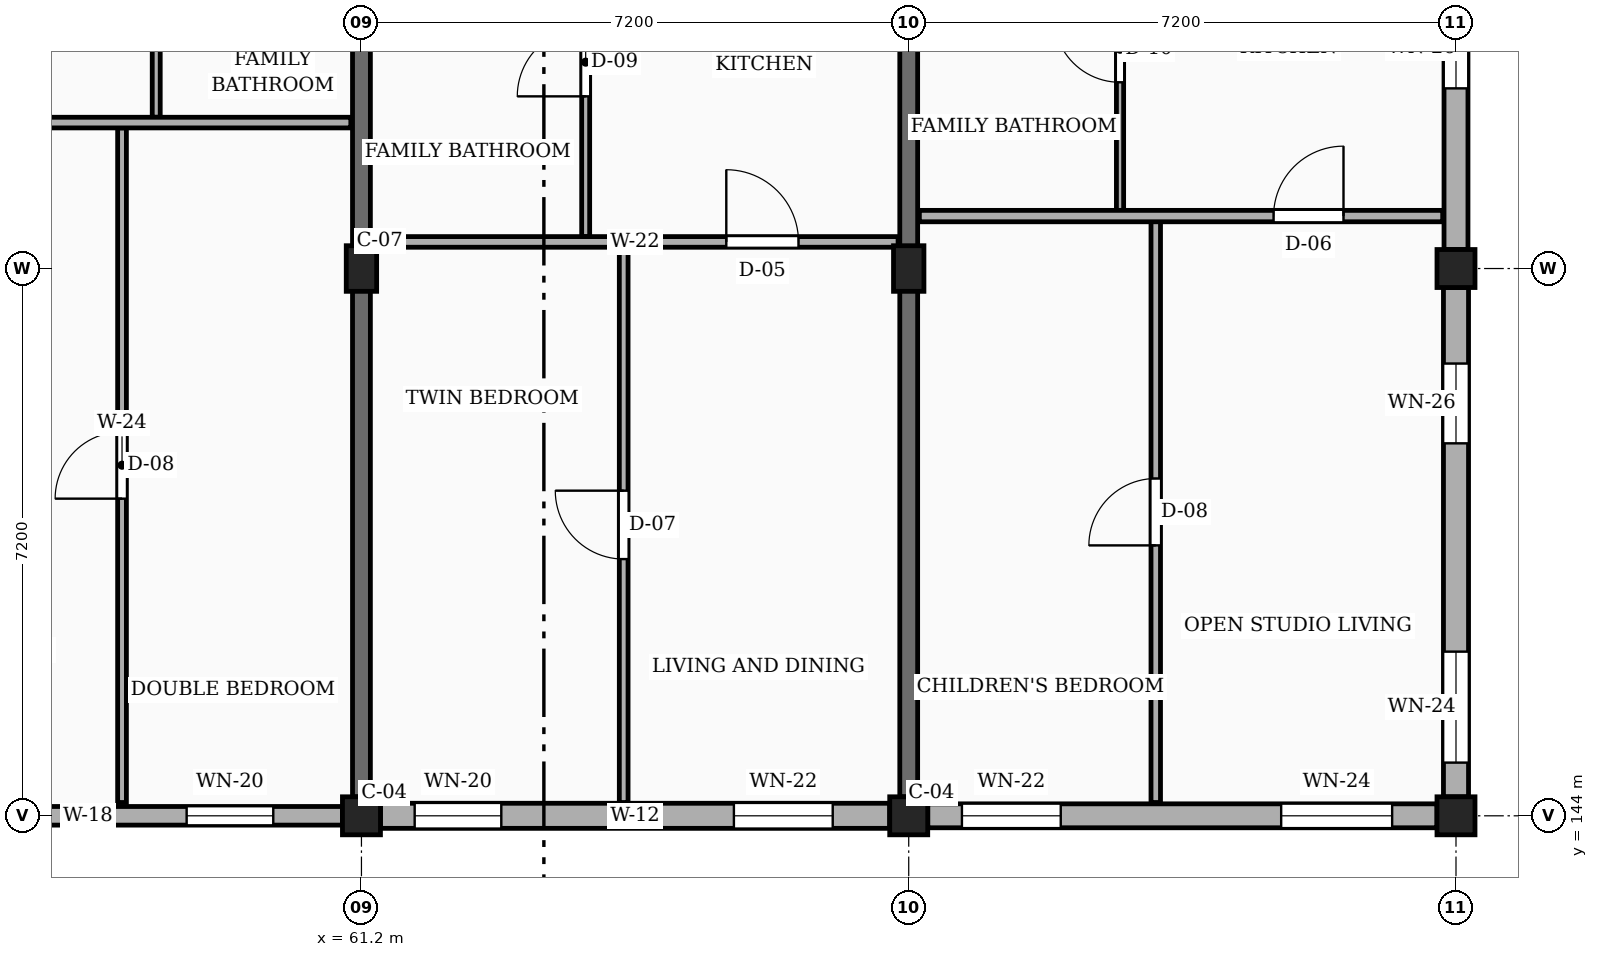
"""IFC4 building model, lengths in metres.
Left out: names, types, materials, properties, quantities, classifications, styles, units other than length and angle.
Written with IfcOpenShell. Run it as: python <this file> out.ifc"""

import sys

from ifc_helpers import new_model, si_unit, direction, frame, frame_2d, origin, origin_2d, place, context, subcontext, project, spatial, rectangle, extrude, element, fill, save


model = new_model("IFC4")
c1 = context("Model", 3, precision=1e-05, world=origin(), true_north=direction((0.0, 1.0)))
c2 = subcontext(c1, "Body", "Model", "MODEL_VIEW")
j1 = project(units=[si_unit("LENGTHUNIT", "METRE"), si_unit("PLANEANGLEUNIT", "RADIAN")], contexts=[c1])
p1 = place(None, origin())
s1 = spatial("IfcSite", under=j1, at=p1, CompositionType="ELEMENT")
p2 = place(p1, origin())
s2 = spatial("IfcBuilding", under=s1, at=p2, CompositionType="ELEMENT")
p3 = place(p2, frame((0.0, 0.0, 23.4)))
s3 = spatial("IfcBuildingStorey", under=s2, at=p3, CompositionType="ELEMENT", Elevation=23.4)
p4 = place(p3, frame((61.2, 144.0, 0.0), z_axis=(0.0, 0.0, 1.0), x_axis=(1.0, 0.0, 0.0)))
e1 = element("IfcColumn", 1, at=p4, inside=s3, PredefinedType="COLUMN", context=c2, shape_type="SweptSolid", body=[
    extrude(rectangle(XDim=0.5, YDim=0.5, at=origin_2d()), origin(), (0.0, 0.0, 1.0), 3.15),
])
p5 = place(p3, frame((61.2, 151.2, 0.0), z_axis=(0.0, 0.0, 1.0), x_axis=(1.0, 0.0, 0.0)))
e2 = element("IfcColumn", 2, at=p5, inside=s3, PredefinedType="COLUMN", context=c2, shape_type="SweptSolid", body=[
    extrude(rectangle(XDim=0.4, YDim=0.6, at=origin_2d()), origin(), (0.0, 0.0, 1.0), 3.15),
])
p6 = place(p3, frame((68.4, 144.0, 0.0), z_axis=(0.0, 0.0, 1.0), x_axis=(1.0, 0.0, 0.0)))
e3 = element("IfcColumn", 3, at=p6, inside=s3, PredefinedType="COLUMN", context=c2, shape_type="SweptSolid", body=[
    extrude(rectangle(XDim=0.5, YDim=0.5, at=origin_2d()), origin(), (0.0, 0.0, 1.0), 3.15),
])
p7 = place(p3, frame((68.4, 151.2, 0.0), z_axis=(0.0, 0.0, 1.0), x_axis=(1.0, 0.0, 0.0)))
e4 = element("IfcColumn", 4, at=p7, inside=s3, PredefinedType="COLUMN", context=c2, shape_type="SweptSolid", body=[
    extrude(rectangle(XDim=0.4, YDim=0.6, at=origin_2d()), origin(), (0.0, 0.0, 1.0), 3.15),
])
for number, where, z_axis, x_axis in (
    (5, (75.6, 144.0, 0.0), (0.0, 0.0, 1.0), (1.0, 0.0, 0.0)),
    (6, (75.6, 151.2, 0.0), (0.0, 0.0, 1.0), (1.0, 0.0, 0.0)),
):
    element("IfcColumn", number, at=place(p3, frame(where, z_axis=z_axis, x_axis=x_axis)), inside=s3, PredefinedType="COLUMN", context=c2, shape_type="SweptSolid", body=[
        extrude(rectangle(XDim=0.5, YDim=0.5, at=origin_2d()), origin(), (0.0, 0.0, 1.0), 3.15),
    ])
for number, where, z_axis, x_axis in (
    (7, (61.2, 144.25, 0.0), (0.0, 0.0, 1.0), (0.0, 1.0, 0.0)),
    (8, (68.4, 144.25, 0.0), (0.0, 0.0, 1.0), (0.0, 1.0, 0.0)),
):
    element("IfcWall", number, at=place(p3, frame(where, z_axis=z_axis, x_axis=x_axis)), inside=s3, PredefinedType="SOLIDWALL", context=c2, shape_type="SweptSolid", body=[
        extrude(rectangle(XDim=11.9, YDim=0.235, at=frame_2d((5.95, 0.0))), origin(), (0.0, 0.0, 1.0), 2.185),
    ])
p8 = place(p3, frame((54.25, 144.0, 0.0), z_axis=(0.0, 0.0, 1.0), x_axis=(1.0, 0.0, 0.0)))
e9 = element("IfcWall", 9, at=p8, inside=s3, PredefinedType="SOLIDWALL", context=c2, shape_type="SweptSolid", body=[
    extrude(rectangle(XDim=6.7, YDim=0.245, at=frame_2d((3.35, 0.0))), origin(), (0.0, 0.0, 1.0), 2.455),
])
p9 = place(p8, frame((0.45, 0.0, 0.78)))
e10 = element("IfcOpeningElement", 10, at=p9, cuts=e9, PredefinedType="OPENING", context=c2, shape_type="SweptSolid", body=[
    extrude(rectangle(XDim=0.98, YDim=1.36, at=frame_2d((0.49, 0.68))), frame((0.0, 0.133, 0.0), z_axis=(0.0, -1.0, 0.0), x_axis=(1.0, 0.0, 0.0)), (0.0, 0.0, 1.0), 0.265),
])
p10 = place(p8, frame((4.65, 0.0, 0.78)))
e11 = element("IfcOpeningElement", 11, at=p10, cuts=e9, PredefinedType="OPENING", context=c2, shape_type="SweptSolid", body=[
    extrude(rectangle(XDim=1.14, YDim=1.36, at=frame_2d((0.57, 0.68))), frame((0.0, 0.133, 0.0), z_axis=(0.0, -1.0, 0.0), x_axis=(1.0, 0.0, 0.0)), (0.0, 0.0, 1.0), 0.265),
])
p11 = place(p3, frame((61.45, 144.0, 0.0), z_axis=(0.0, 0.0, 1.0), x_axis=(1.0, 0.0, 0.0)))
e12 = element("IfcWall", 12, at=p11, inside=s3, PredefinedType="SOLIDWALL", context=c2, shape_type="SweptSolid", body=[
    extrude(rectangle(XDim=6.7, YDim=0.33, at=frame_2d((3.35, 0.0))), origin(), (0.0, 0.0, 1.0), 2.455),
])
p12 = place(p11, frame((0.45, 0.0, 0.78)))
e13 = element("IfcOpeningElement", 13, at=p12, cuts=e12, PredefinedType="OPENING", context=c2, shape_type="SweptSolid", body=[
    extrude(rectangle(XDim=1.14, YDim=1.36, at=frame_2d((0.57, 0.68))), frame((0.0, 0.175, 0.0), z_axis=(0.0, -1.0, 0.0), x_axis=(1.0, 0.0, 0.0)), (0.0, 0.0, 1.0), 0.35),
])
p13 = place(p11, frame((4.65, 0.0, 0.78)))
e14 = element("IfcOpeningElement", 14, at=p13, cuts=e12, PredefinedType="OPENING", context=c2, shape_type="SweptSolid", body=[
    extrude(rectangle(XDim=1.3, YDim=1.36, at=frame_2d((0.65, 0.68))), frame((0.0, 0.175, 0.0), z_axis=(0.0, -1.0, 0.0), x_axis=(1.0, 0.0, 0.0)), (0.0, 0.0, 1.0), 0.35),
])
p14 = place(p3, frame((68.65, 144.0, 0.0), z_axis=(0.0, 0.0, 1.0), x_axis=(1.0, 0.0, 0.0)))
e15 = element("IfcWall", 15, at=p14, inside=s3, PredefinedType="SOLIDWALL", context=c2, shape_type="SweptSolid", body=[
    extrude(rectangle(XDim=6.7, YDim=0.315, at=frame_2d((3.35, 0.0))), origin(), (0.0, 0.0, 1.0), 2.455),
])
p15 = place(p14, frame((0.45, 0.0, 0.78)))
e16 = element("IfcOpeningElement", 16, at=p15, cuts=e15, PredefinedType="OPENING", context=c2, shape_type="SweptSolid", body=[
    extrude(rectangle(XDim=1.3, YDim=1.36, at=frame_2d((0.65, 0.68))), frame((0.0, 0.167, 0.0), z_axis=(0.0, -1.0, 0.0), x_axis=(1.0, 0.0, 0.0)), (0.0, 0.0, 1.0), 0.335),
])
p16 = place(p14, frame((4.65, 0.0, 0.78)))
e17 = element("IfcOpeningElement", 17, at=p16, cuts=e15, PredefinedType="OPENING", context=c2, shape_type="SweptSolid", body=[
    extrude(rectangle(XDim=1.46, YDim=1.36, at=frame_2d((0.73, 0.68))), frame((0.0, 0.167, 0.0), z_axis=(0.0, -1.0, 0.0), x_axis=(1.0, 0.0, 0.0)), (0.0, 0.0, 1.0), 0.335),
])
p17 = place(p3, frame((75.6, 144.25, 0.0), z_axis=(0.0, 0.0, 1.0), x_axis=(0.0, 1.0, 0.0)))
e18 = element("IfcWall", 18, at=p17, inside=s3, PredefinedType="SOLIDWALL", context=c2, shape_type="SweptSolid", body=[
    extrude(rectangle(XDim=6.7, YDim=0.33, at=frame_2d((3.35, 0.0))), origin(), (0.0, 0.0, 1.0), 2.455),
])
p18 = place(p17, frame((0.45, 0.0, 0.78)))
e19 = element("IfcOpeningElement", 19, at=p18, cuts=e18, PredefinedType="OPENING", context=c2, shape_type="SweptSolid", body=[
    extrude(rectangle(XDim=1.46, YDim=1.36, at=frame_2d((0.73, 0.68))), frame((0.0, 0.175, 0.0), z_axis=(0.0, -1.0, 0.0), x_axis=(1.0, 0.0, 0.0)), (0.0, 0.0, 1.0), 0.35),
])
p19 = place(p17, frame((4.65, 0.0, 0.78)))
e20 = element("IfcOpeningElement", 20, at=p19, cuts=e18, PredefinedType="OPENING", context=c2, shape_type="SweptSolid", body=[
    extrude(rectangle(XDim=1.05, YDim=1.44, at=frame_2d((0.525, 0.72))), frame((0.0, 0.175, 0.0), z_axis=(0.0, -1.0, 0.0), x_axis=(1.0, 0.0, 0.0)), (0.0, 0.0, 1.0), 0.35),
])
p20 = place(p3, frame((75.6, 151.45, 0.0), z_axis=(0.0, 0.0, 1.0), x_axis=(0.0, 1.0, 0.0)))
e21 = element("IfcWall", 21, at=p20, inside=s3, PredefinedType="SOLIDWALL", context=c2, shape_type="SweptSolid", body=[
    extrude(rectangle(XDim=6.7, YDim=0.315, at=frame_2d((3.35, 0.0))), origin(), (0.0, 0.0, 1.0), 2.455),
])
p21 = place(p20, frame((2.12, 0.0, 0.78)))
e22 = element("IfcOpeningElement", 22, at=p21, cuts=e21, PredefinedType="OPENING", context=c2, shape_type="SweptSolid", body=[
    extrude(rectangle(XDim=1.05, YDim=1.44, at=frame_2d((0.525, 0.72))), frame((0.0, 0.167, 0.0), z_axis=(0.0, -1.0, 0.0), x_axis=(1.0, 0.0, 0.0)), (0.0, 0.0, 1.0), 0.335),
])
p22 = place(p20, frame((5.185, 0.0, 0.78)))
e23 = element("IfcOpeningElement", 23, at=p22, cuts=e21, PredefinedType="OPENING", context=c2, shape_type="SweptSolid", body=[
    extrude(rectangle(XDim=1.04, YDim=1.26, at=frame_2d((0.52, 0.63))), frame((0.0, 0.167, 0.0), z_axis=(0.0, -1.0, 0.0), x_axis=(1.0, 0.0, 0.0)), (0.0, 0.0, 1.0), 0.335),
])
p23 = place(p3, frame((58.05, 144.175, 0.0), z_axis=(0.0, 0.0, 1.0), x_axis=(0.0, 1.0, 0.0)))
e24 = element("IfcWall", 24, at=p23, inside=s3, PredefinedType="PARTITIONING", context=c2, shape_type="SweptSolid", body=[
    extrude(rectangle(XDim=8.875, YDim=0.115, at=frame_2d((4.438, 0.0))), origin(), (0.0, 0.0, 1.0), 2.32),
])
p24 = place(p23, frame((3.998, 0.0, 0.0)))
e25 = element("IfcOpeningElement", 25, at=p24, cuts=e24, PredefinedType="OPENING", context=c2, shape_type="SweptSolid", body=[
    extrude(rectangle(XDim=0.88, YDim=2.08, at=frame_2d((0.44, 1.04))), frame((0.0, 0.067, 0.0), z_axis=(0.0, -1.0, 0.0), x_axis=(1.0, 0.0, 0.0)), (0.0, 0.0, 1.0), 0.135),
])
p25 = place(p3, frame((58.5, 153.19, 0.0), z_axis=(0.0, 0.0, 1.0), x_axis=(0.0, 1.0, 0.0)))
e26 = element("IfcWall", 26, at=p25, inside=s3, PredefinedType="PARTITIONING", context=c2, shape_type="SweptSolid", body=[
    extrude(rectangle(XDim=3.02, YDim=0.105, at=frame_2d((1.51, 0.0))), origin(), (0.0, 0.0, 1.0), 2.32),
])
p26 = place(p25, frame((1.075, 0.0, 0.0)))
e27 = element("IfcOpeningElement", 27, at=p26, cuts=e26, PredefinedType="OPENING", context=c2, shape_type="SweptSolid", body=[
    extrude(rectangle(XDim=0.87, YDim=2.05, at=frame_2d((0.435, 1.025))), frame((0.0, 0.062, 0.0), z_axis=(0.0, -1.0, 0.0), x_axis=(1.0, 0.0, 0.0)), (0.0, 0.0, 1.0), 0.125),
])
p27 = place(p3, frame((54.14, 153.12, 0.0), z_axis=(0.0, 0.0, 1.0), x_axis=(1.0, 0.0, 0.0)))
e28 = element("IfcWall", 28, at=p27, inside=s3, PredefinedType="PARTITIONING", context=c2, shape_type="SweptSolid", body=[
    extrude(rectangle(XDim=6.92, YDim=0.14, at=frame_2d((3.46, 0.0))), origin(), (0.0, 0.0, 1.0), 2.32),
])
p28 = place(p27, frame((1.31, 0.0, 0.0)))
e29 = element("IfcOpeningElement", 29, at=p28, cuts=e28, PredefinedType="OPENING", context=c2, shape_type="SweptSolid", body=[
    extrude(rectangle(XDim=0.92, YDim=2.1, at=frame_2d((0.46, 1.05))), frame((0.0, 0.08, 0.0), z_axis=(0.0, -1.0, 0.0), x_axis=(1.0, 0.0, 0.0)), (0.0, 0.0, 1.0), 0.16),
])
p29 = place(p3, frame((64.65, 144.175, 0.0), z_axis=(0.0, 0.0, 1.0), x_axis=(0.0, 1.0, 0.0)))
e30 = element("IfcWall", 30, at=p29, inside=s3, PredefinedType="PARTITIONING", context=c2, shape_type="SweptSolid", body=[
    extrude(rectangle(XDim=7.305, YDim=0.115, at=frame_2d((3.652, 0.0))), origin(), (0.0, 0.0, 1.0), 2.32),
])
p30 = place(p29, frame((3.202, 0.0, 0.0)))
e31 = element("IfcOpeningElement", 31, at=p30, cuts=e30, PredefinedType="OPENING", context=c2, shape_type="SweptSolid", body=[
    extrude(rectangle(XDim=0.9, YDim=2.1, at=frame_2d((0.45, 1.05))), frame((0.0, 0.067, 0.0), z_axis=(0.0, -1.0, 0.0), x_axis=(1.0, 0.0, 0.0)), (0.0, 0.0, 1.0), 0.135),
])
p31 = place(p3, frame((64.15, 151.62, 0.0), z_axis=(0.0, 0.0, 1.0), x_axis=(0.0, 1.0, 0.0)))
e32 = element("IfcWall", 32, at=p31, inside=s3, PredefinedType="PARTITIONING", context=c2, shape_type="SweptSolid", body=[
    extrude(rectangle(XDim=4.59, YDim=0.105, at=frame_2d((2.295, 0.0))), origin(), (0.0, 0.0, 1.0), 2.32),
])
p32 = place(p31, frame((1.845, 0.0, 0.0)))
e33 = element("IfcOpeningElement", 33, at=p32, cuts=e32, PredefinedType="OPENING", context=c2, shape_type="SweptSolid", body=[
    extrude(rectangle(XDim=0.9, YDim=2.05, at=frame_2d((0.45, 1.025))), frame((0.0, 0.062, 0.0), z_axis=(0.0, -1.0, 0.0), x_axis=(1.0, 0.0, 0.0)), (0.0, 0.0, 1.0), 0.125),
])
p33 = place(p3, frame((61.34, 151.55, 0.0), z_axis=(0.0, 0.0, 1.0), x_axis=(1.0, 0.0, 0.0)))
e34 = element("IfcWall", 34, at=p33, inside=s3, PredefinedType="PARTITIONING", context=c2, shape_type="SweptSolid", body=[
    extrude(rectangle(XDim=6.92, YDim=0.14, at=frame_2d((3.46, 0.0))), origin(), (0.0, 0.0, 1.0), 2.32),
])
p34 = place(p33, frame((4.66, 0.0, 0.0)))
e35 = element("IfcOpeningElement", 35, at=p34, cuts=e34, PredefinedType="OPENING", context=c2, shape_type="SweptSolid", body=[
    extrude(rectangle(XDim=0.95, YDim=2.1, at=frame_2d((0.475, 1.05))), frame((0.0, 0.08, 0.0), z_axis=(0.0, -1.0, 0.0), x_axis=(1.0, 0.0, 0.0)), (0.0, 0.0, 1.0), 0.16),
])
p35 = place(p3, frame((71.65, 144.175, 0.0), z_axis=(0.0, 0.0, 1.0), x_axis=(0.0, 1.0, 0.0)))
e36 = element("IfcWall", 36, at=p35, inside=s3, PredefinedType="PARTITIONING", context=c2, shape_type="SweptSolid", body=[
    extrude(rectangle(XDim=7.645, YDim=0.125, at=frame_2d((3.823, 0.0))), origin(), (0.0, 0.0, 1.0), 2.32),
])
p36 = place(p35, frame((3.383, 0.0, 0.0)))
e37 = element("IfcOpeningElement", 37, at=p36, cuts=e36, PredefinedType="OPENING", context=c2, shape_type="SweptSolid", body=[
    extrude(rectangle(XDim=0.88, YDim=2.08, at=frame_2d((0.44, 1.04))), frame((0.0, 0.073, 0.0), z_axis=(0.0, -1.0, 0.0), x_axis=(1.0, 0.0, 0.0)), (0.0, 0.0, 1.0), 0.145),
])
p37 = place(p3, frame((71.18, 151.96, 0.0), z_axis=(0.0, 0.0, 1.0), x_axis=(0.0, 1.0, 0.0)))
e38 = element("IfcWall", 38, at=p37, inside=s3, PredefinedType="PARTITIONING", context=c2, shape_type="SweptSolid", body=[
    extrude(rectangle(XDim=4.25, YDim=0.095, at=frame_2d((2.125, 0.0))), origin(), (0.0, 0.0, 1.0), 2.32),
])
p38 = place(p37, frame((1.69, 0.0, 0.0)))
e39 = element("IfcOpeningElement", 39, at=p38, cuts=e38, PredefinedType="OPENING", context=c2, shape_type="SweptSolid", body=[
    extrude(rectangle(XDim=0.87, YDim=2.05, at=frame_2d((0.435, 1.025))), frame((0.0, 0.058, 0.0), z_axis=(0.0, -1.0, 0.0), x_axis=(1.0, 0.0, 0.0)), (0.0, 0.0, 1.0), 0.115),
])
p39 = place(p3, frame((68.54, 151.89, 0.0), z_axis=(0.0, 0.0, 1.0), x_axis=(1.0, 0.0, 0.0)))
e40 = element("IfcWall", 40, at=p39, inside=s3, PredefinedType="PARTITIONING", context=c2, shape_type="SweptSolid", body=[
    extrude(rectangle(XDim=6.885, YDim=0.15, at=frame_2d((3.442, 0.0))), origin(), (0.0, 0.0, 1.0), 2.32),
])
p40 = place(p39, frame((4.66, 0.0, 0.0)))
e41 = element("IfcOpeningElement", 41, at=p40, cuts=e40, PredefinedType="OPENING", context=c2, shape_type="SweptSolid", body=[
    extrude(rectangle(XDim=0.92, YDim=2.1, at=frame_2d((0.46, 1.05))), frame((0.0, 0.085, 0.0), z_axis=(0.0, -1.0, 0.0), x_axis=(1.0, 0.0, 0.0)), (0.0, 0.0, 1.0), 0.17),
])
p41 = place(p10, origin())
e42 = element("IfcWindow", 42, at=p41, inside=s3, PartitioningType="SINGLE_PANEL", PredefinedType="WINDOW", context=c2, shape_type="SweptSolid", body=[
    extrude(rectangle(XDim=1.14, YDim=1.36, at=frame_2d((0.57, 0.68))), frame((0.0, 0.03, 0.0), z_axis=(0.0, -1.0, 0.0), x_axis=(1.0, 0.0, 0.0)), (0.0, 0.0, 1.0), 0.06),
])
fill(e11, e42)
p42 = place(p12, origin())
e43 = element("IfcWindow", 43, at=p42, inside=s3, PartitioningType="SINGLE_PANEL", PredefinedType="WINDOW", context=c2, shape_type="SweptSolid", body=[
    extrude(rectangle(XDim=1.14, YDim=1.36, at=frame_2d((0.57, 0.68))), frame((0.0, 0.03, 0.0), z_axis=(0.0, -1.0, 0.0), x_axis=(1.0, 0.0, 0.0)), (0.0, 0.0, 1.0), 0.06),
])
fill(e13, e43)
p43 = place(p13, origin())
e44 = element("IfcWindow", 44, at=p43, inside=s3, PartitioningType="SINGLE_PANEL", PredefinedType="WINDOW", context=c2, shape_type="SweptSolid", body=[
    extrude(rectangle(XDim=1.3, YDim=1.36, at=frame_2d((0.65, 0.68))), frame((0.0, 0.03, 0.0), z_axis=(0.0, -1.0, 0.0), x_axis=(1.0, 0.0, 0.0)), (0.0, 0.0, 1.0), 0.06),
])
fill(e14, e44)
p44 = place(p15, origin())
e45 = element("IfcWindow", 45, at=p44, inside=s3, PartitioningType="SINGLE_PANEL", PredefinedType="WINDOW", context=c2, shape_type="SweptSolid", body=[
    extrude(rectangle(XDim=1.3, YDim=1.36, at=frame_2d((0.65, 0.68))), frame((0.0, 0.03, 0.0), z_axis=(0.0, -1.0, 0.0), x_axis=(1.0, 0.0, 0.0)), (0.0, 0.0, 1.0), 0.06),
])
fill(e16, e45)
p45 = place(p16, origin())
e46 = element("IfcWindow", 46, at=p45, inside=s3, PartitioningType="SINGLE_PANEL", PredefinedType="WINDOW", context=c2, shape_type="SweptSolid", body=[
    extrude(rectangle(XDim=1.46, YDim=1.36, at=frame_2d((0.73, 0.68))), frame((0.0, 0.03, 0.0), z_axis=(0.0, -1.0, 0.0), x_axis=(1.0, 0.0, 0.0)), (0.0, 0.0, 1.0), 0.06),
])
fill(e17, e46)
p46 = place(p18, origin())
e47 = element("IfcWindow", 47, at=p46, inside=s3, PartitioningType="SINGLE_PANEL", PredefinedType="WINDOW", context=c2, shape_type="SweptSolid", body=[
    extrude(rectangle(XDim=1.46, YDim=1.36, at=frame_2d((0.73, 0.68))), frame((0.0, 0.03, 0.0), z_axis=(0.0, -1.0, 0.0), x_axis=(1.0, 0.0, 0.0)), (0.0, 0.0, 1.0), 0.06),
])
fill(e19, e47)
p47 = place(p19, origin())
e48 = element("IfcWindow", 48, at=p47, inside=s3, PartitioningType="SINGLE_PANEL", PredefinedType="WINDOW", context=c2, shape_type="SweptSolid", body=[
    extrude(rectangle(XDim=1.05, YDim=1.44, at=frame_2d((0.525, 0.72))), frame((0.0, 0.03, 0.0), z_axis=(0.0, -1.0, 0.0), x_axis=(1.0, 0.0, 0.0)), (0.0, 0.0, 1.0), 0.06),
])
fill(e20, e48)
p48 = place(p21, origin())
e49 = element("IfcWindow", 49, at=p48, inside=s3, PartitioningType="SINGLE_PANEL", PredefinedType="WINDOW", context=c2, shape_type="SweptSolid", body=[
    extrude(rectangle(XDim=1.05, YDim=1.44, at=frame_2d((0.525, 0.72))), frame((0.0, 0.03, 0.0), z_axis=(0.0, -1.0, 0.0), x_axis=(1.0, 0.0, 0.0)), (0.0, 0.0, 1.0), 0.06),
])
fill(e22, e49)
p49 = place(p24, origin())
e50 = element("IfcDoor", 50, at=p49, inside=s3, OperationType="SINGLE_SWING_LEFT", PredefinedType="DOOR", context=c2, shape_type="SweptSolid", body=[
    extrude(rectangle(XDim=0.88, YDim=2.08, at=frame_2d((0.44, 1.04))), frame((0.0, 0.025, 0.0), z_axis=(0.0, -1.0, 0.0), x_axis=(1.0, 0.0, 0.0)), (0.0, 0.0, 1.0), 0.05),
])
fill(e25, e50)
p50 = place(p30, origin())
e51 = element("IfcDoor", 51, at=p50, inside=s3, OperationType="SINGLE_SWING_RIGHT", PredefinedType="DOOR", context=c2, shape_type="SweptSolid", body=[
    extrude(rectangle(XDim=0.9, YDim=2.1, at=frame_2d((0.45, 1.05))), frame((0.0, 0.025, 0.0), z_axis=(0.0, -1.0, 0.0), x_axis=(1.0, 0.0, 0.0)), (0.0, 0.0, 1.0), 0.05),
])
fill(e31, e51)
p51 = place(p32, origin())
e52 = element("IfcDoor", 52, at=p51, inside=s3, OperationType="SINGLE_SWING_LEFT", PredefinedType="DOOR", context=c2, shape_type="SweptSolid", body=[
    extrude(rectangle(XDim=0.9, YDim=2.05, at=frame_2d((0.45, 1.025))), frame((0.0, 0.025, 0.0), z_axis=(0.0, -1.0, 0.0), x_axis=(1.0, 0.0, 0.0)), (0.0, 0.0, 1.0), 0.05),
])
fill(e33, e52)
p52 = place(p34, origin())
e53 = element("IfcDoor", 53, at=p52, inside=s3, OperationType="SINGLE_SWING_LEFT", PredefinedType="DOOR", context=c2, shape_type="SweptSolid", body=[
    extrude(rectangle(XDim=0.95, YDim=2.1, at=frame_2d((0.475, 1.05))), frame((0.0, 0.025, 0.0), z_axis=(0.0, -1.0, 0.0), x_axis=(1.0, 0.0, 0.0)), (0.0, 0.0, 1.0), 0.05),
])
fill(e35, e53)
p53 = place(p36, origin())
e54 = element("IfcDoor", 54, at=p53, inside=s3, OperationType="SINGLE_SWING_LEFT", PredefinedType="DOOR", context=c2, shape_type="SweptSolid", body=[
    extrude(rectangle(XDim=0.88, YDim=2.08, at=frame_2d((0.44, 1.04))), frame((0.0, 0.025, 0.0), z_axis=(0.0, -1.0, 0.0), x_axis=(1.0, 0.0, 0.0)), (0.0, 0.0, 1.0), 0.05),
])
fill(e37, e54)
p54 = place(p38, origin())
e55 = element("IfcDoor", 55, at=p54, inside=s3, OperationType="SINGLE_SWING_RIGHT", PredefinedType="DOOR", context=c2, shape_type="SweptSolid", body=[
    extrude(rectangle(XDim=0.87, YDim=2.05, at=frame_2d((0.435, 1.025))), frame((0.0, 0.025, 0.0), z_axis=(0.0, -1.0, 0.0), x_axis=(1.0, 0.0, 0.0)), (0.0, 0.0, 1.0), 0.05),
])
fill(e39, e55)
p55 = place(p40, origin())
e56 = element("IfcDoor", 56, at=p55, inside=s3, OperationType="SINGLE_SWING_RIGHT", PredefinedType="DOOR", context=c2, shape_type="SweptSolid", body=[
    extrude(rectangle(XDim=0.92, YDim=2.1, at=frame_2d((0.46, 1.05))), frame((0.0, 0.025, 0.0), z_axis=(0.0, -1.0, 0.0), x_axis=(1.0, 0.0, 0.0)), (0.0, 0.0, 1.0), 0.05),
])
fill(e41, e56)
save(model, sys.argv[1])
